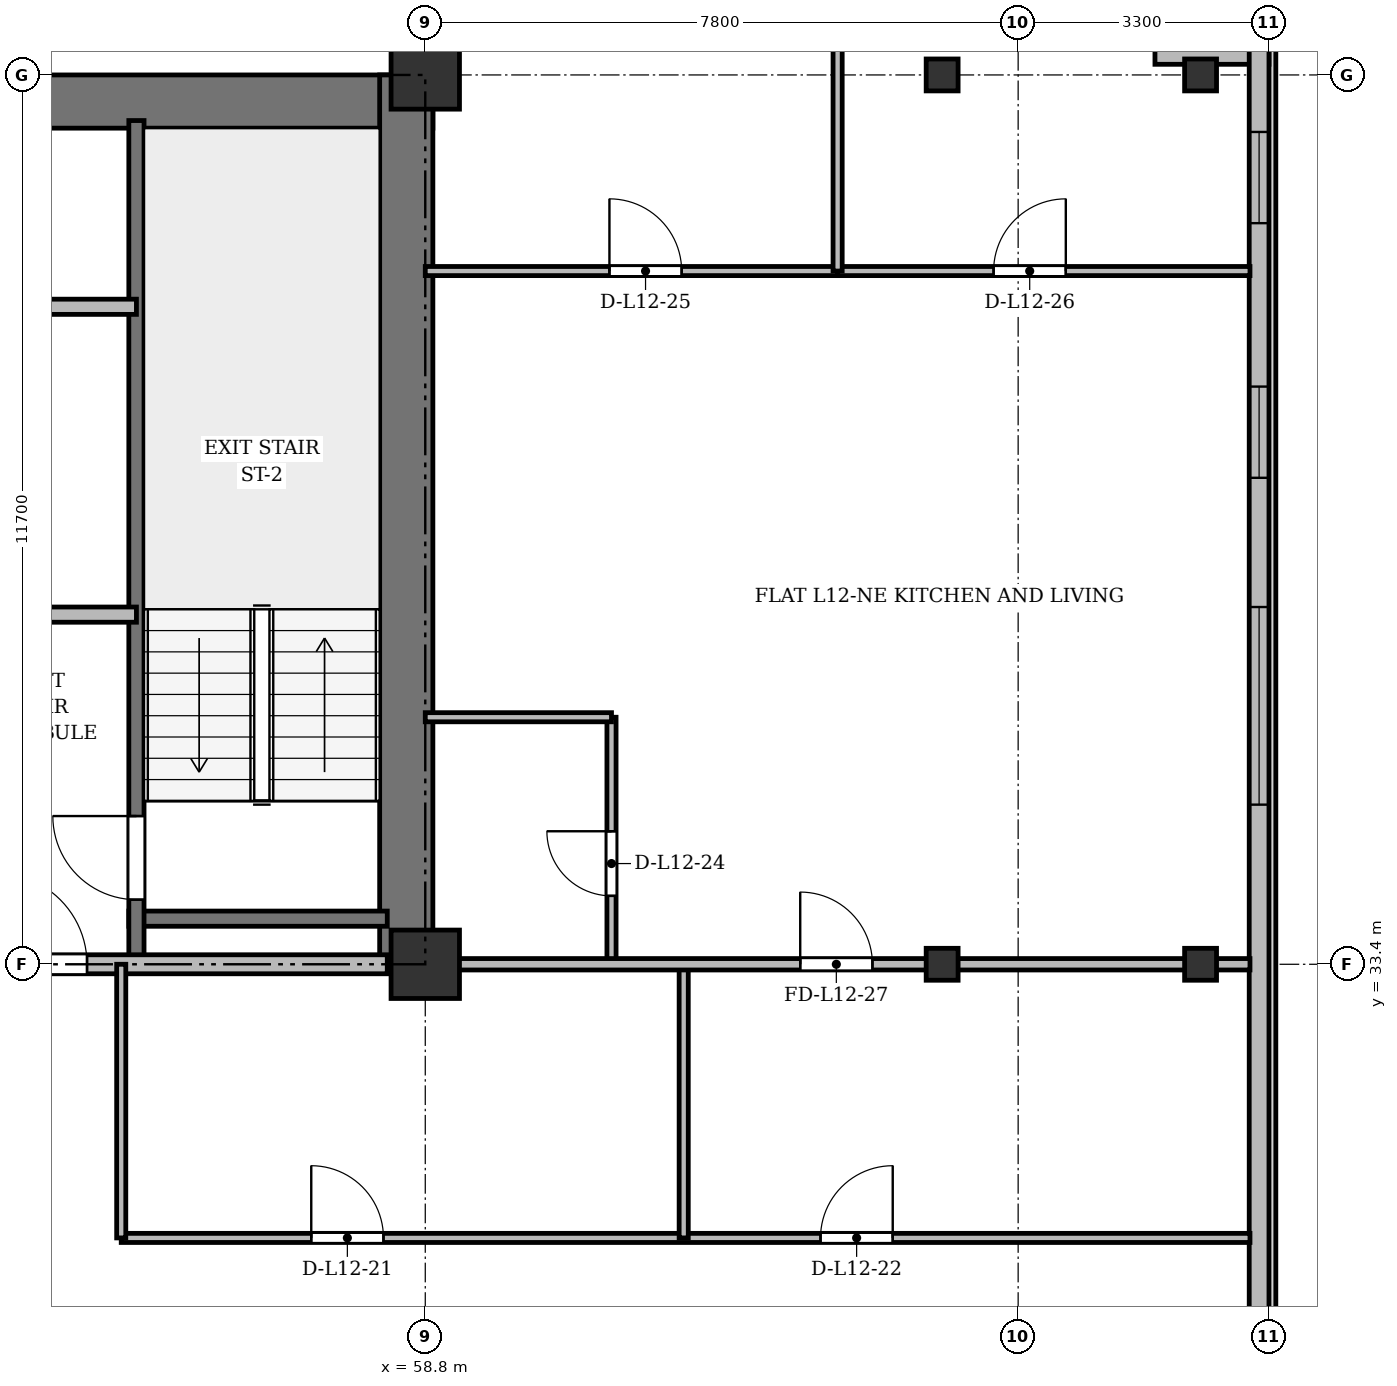
"""IFC4 building model, lengths in metres.
Left out: names, types, materials, properties, quantities, classifications, styles, units other than length and angle.
Written with IfcOpenShell. Run it as: python <this file> out.ifc"""

import sys

from ifc_helpers import new_model, si_unit, direction, frame, frame_2d, origin, origin_2d, place, context, subcontext, project, spatial, rectangle, i_section, extrude, source, transform, mapped, element, fill, save


model = new_model("IFC4")
c1 = context("Model", 3, precision=1e-05, world=origin(), true_north=direction((0.0, 1.0)))
c2 = subcontext(c1, "Body", "Model", "MODEL_VIEW")
j1 = project(units=[si_unit("LENGTHUNIT", "METRE"), si_unit("PLANEANGLEUNIT", "RADIAN")], contexts=[c1])
p1 = place(None, origin())
s1 = spatial("IfcSite", under=j1, at=p1, CompositionType="ELEMENT")
p2 = place(p1, origin())
s2 = spatial("IfcBuilding", under=s1, at=p2, CompositionType="ELEMENT")
p3 = place(p2, frame((0.0, 0.0, 48.7)))
s3 = spatial("IfcBuildingStorey", under=s2, at=p3, CompositionType="ELEMENT", Elevation=48.7)
m1 = source(origin(), c2, "Body", "SweptSolid", [
    extrude(rectangle(XDim=0.9, YDim=0.9, at=origin_2d()), origin(), (0.0, 0.0, 1.0), 3.6),
])
for number, where, z_axis, x_axis in (
    (1, (58.8, 33.4, 0.0), (0.0, 0.0, 1.0), (1.0, 0.0, 0.0)),
    (2, (58.8, 45.1, 0.0), (0.0, 0.0, 1.0), (1.0, 0.0, 0.0)),
):
    element("IfcColumn", number, at=place(p3, frame(where, z_axis=z_axis, x_axis=x_axis)), inside=s3, PredefinedType="COLUMN", context=c2, shape_type="MappedRepresentation", body=[
        mapped(m1, transform((0.0, 0.0, 0.0), x_axis=(1.0, 0.0, 0.0), y_axis=(0.0, 1.0, 0.0), z_axis=(0.0, 0.0, 1.0), scale=1.0)),
    ])
m2 = source(origin(), c2, "Body", "SweptSolid", [
    extrude(i_section(OverallWidth=0.42, OverallDepth=0.42, WebThickness=0.026, FlangeThickness=0.04, at=origin_2d()), origin(), (0.0, 0.0, 1.0), 3.6),
])
for number, where, z_axis, x_axis in (
    (3, (65.6, 33.4, 0.0), (0.0, 0.0, 1.0), (1.0, 0.0, 0.0)),
    (4, (65.6, 45.1, 0.0), (0.0, 0.0, 1.0), (1.0, 0.0, 0.0)),
    (5, (69.0, 33.4, 0.0), (0.0, 0.0, 1.0), (1.0, 0.0, 0.0)),
    (6, (69.0, 45.1, 0.0), (0.0, 0.0, 1.0), (1.0, 0.0, 0.0)),
):
    element("IfcColumn", number, at=place(p3, frame(where, z_axis=z_axis, x_axis=x_axis)), inside=s3, PredefinedType="COLUMN", context=c2, shape_type="MappedRepresentation", body=[
        mapped(m2, transform((0.0, 0.0, 0.0), x_axis=(1.0, 0.0, 0.0), y_axis=(0.0, 1.0, 0.0), z_axis=(0.0, 0.0, 1.0), scale=1.0)),
    ])
p4 = place(p3, frame((68.4, 45.37, 0.0), z_axis=(0.0, 0.0, 1.0), x_axis=(1.0, 0.0, 0.0)))
e7 = element("IfcWall", 7, at=p4, inside=s3, PredefinedType="SOLIDWALL", context=c2, shape_type="SweptSolid", body=[
    extrude(rectangle(XDim=1.5, YDim=0.26, at=frame_2d((0.75, 0.0))), origin(), (0.0, 0.0, 1.0), 2.69),
])
p5 = place(p3, frame((69.77, 45.5, 0.0), z_axis=(0.0, 0.0, 1.0), x_axis=(0.0, -1.0, 0.0)))
e8 = element("IfcWall", 8, at=p5, inside=s3, PredefinedType="SOLIDWALL", context=c2, shape_type="SweptSolid", body=[
    extrude(rectangle(XDim=39.6, YDim=0.26, at=frame_2d((19.8, 0.0))), origin(), (0.0, 0.0, 1.0), 3.34),
])
p6 = place(p5, frame((36.95, 0.0, 0.92)))
e9 = element("IfcOpeningElement", 9, at=p6, cuts=e8, PredefinedType="OPENING", context=c2, shape_type="SweptSolid", body=[
    extrude(rectangle(XDim=1.2, YDim=1.65, at=frame_2d((0.6, 0.825))), frame((0.0, 0.14, 0.0), z_axis=(0.0, -1.0, 0.0), x_axis=(1.0, 0.0, 0.0)), (0.0, 0.0, 1.0), 0.28),
])
p7 = place(p5, frame((32.8, 0.0, 0.92)))
e10 = element("IfcOpeningElement", 10, at=p7, cuts=e8, PredefinedType="OPENING", context=c2, shape_type="SweptSolid", body=[
    extrude(rectangle(XDim=2.6, YDim=1.9, at=frame_2d((1.3, 0.95))), frame((0.0, 0.14, 0.0), z_axis=(0.0, -1.0, 0.0), x_axis=(1.0, 0.0, 0.0)), (0.0, 0.0, 1.0), 0.28),
])
p8 = place(p5, frame((28.6, 0.0, 0.92)))
e11 = element("IfcOpeningElement", 11, at=p8, cuts=e8, PredefinedType="OPENING", context=c2, shape_type="SweptSolid", body=[
    extrude(rectangle(XDim=2.6, YDim=1.9, at=frame_2d((1.3, 0.95))), frame((0.0, 0.14, 0.0), z_axis=(0.0, -1.0, 0.0), x_axis=(1.0, 0.0, 0.0)), (0.0, 0.0, 1.0), 0.28),
])
p9 = place(p5, frame((21.4, 0.0, 0.92)))
e12 = element("IfcOpeningElement", 12, at=p9, cuts=e8, PredefinedType="OPENING", context=c2, shape_type="SweptSolid", body=[
    extrude(rectangle(XDim=2.6, YDim=1.9, at=frame_2d((1.3, 0.95))), frame((0.0, 0.14, 0.0), z_axis=(0.0, -1.0, 0.0), x_axis=(1.0, 0.0, 0.0)), (0.0, 0.0, 1.0), 0.28),
])
p10 = place(p5, frame((7.4, 0.0, 0.92)))
e13 = element("IfcOpeningElement", 13, at=p10, cuts=e8, PredefinedType="OPENING", context=c2, shape_type="SweptSolid", body=[
    extrude(rectangle(XDim=2.6, YDim=1.9, at=frame_2d((1.3, 0.95))), frame((0.0, 0.14, 0.0), z_axis=(0.0, -1.0, 0.0), x_axis=(1.0, 0.0, 0.0)), (0.0, 0.0, 1.0), 0.28),
])
p11 = place(p5, frame((4.5, 0.0, 0.92)))
e14 = element("IfcOpeningElement", 14, at=p11, cuts=e8, PredefinedType="OPENING", context=c2, shape_type="SweptSolid", body=[
    extrude(rectangle(XDim=1.2, YDim=1.65, at=frame_2d((0.6, 0.825))), frame((0.0, 0.14, 0.0), z_axis=(0.0, -1.0, 0.0), x_axis=(1.0, 0.0, 0.0)), (0.0, 0.0, 1.0), 0.28),
])
p12 = place(p5, frame((1.15, 0.0, 0.92)))
e15 = element("IfcOpeningElement", 15, at=p12, cuts=e8, PredefinedType="OPENING", context=c2, shape_type="SweptSolid", body=[
    extrude(rectangle(XDim=1.2, YDim=1.65, at=frame_2d((0.6, 0.825))), frame((0.0, 0.14, 0.0), z_axis=(0.0, -1.0, 0.0), x_axis=(1.0, 0.0, 0.0)), (0.0, 0.0, 1.0), 0.28),
])
p13 = place(p3, frame((15.5, 44.75, 0.0), z_axis=(0.0, 0.0, 1.0), x_axis=(1.0, 0.0, 0.0)))
e16 = element("IfcWall", 16, at=p13, inside=s3, PredefinedType="SHEAR", context=c2, shape_type="SweptSolid", body=[
    extrude(rectangle(XDim=43.4, YDim=0.7, at=frame_2d((21.7, 0.0))), origin(), (0.0, 0.0, 1.0), 3.34),
])
p14 = place(p3, frame((58.55, 33.4, 0.0), z_axis=(0.0, 0.0, 1.0), x_axis=(0.0, 1.0, 0.0)))
e17 = element("IfcWall", 17, at=p14, inside=s3, PredefinedType="SHEAR", context=c2, shape_type="SweptSolid", body=[
    extrude(rectangle(XDim=11.7, YDim=0.7, at=frame_2d((5.85, 0.0))), origin(), (0.0, 0.0, 1.0), 3.34),
])
p15 = place(p3, frame((54.9, 34.0, 0.0), z_axis=(0.0, 0.0, 1.0), x_axis=(1.0, 0.0, 0.0)))
e18 = element("IfcWall", 18, at=p15, inside=s3, PredefinedType="SHEAR", context=c2, shape_type="SweptSolid", body=[
    extrude(rectangle(XDim=3.4, YDim=0.2, at=frame_2d((1.7, 0.0))), origin(), (0.0, 0.0, 1.0), 3.34),
])
p16 = place(p3, frame((55.0, 33.4, 0.0), z_axis=(0.0, 0.0, 1.0), x_axis=(0.0, 1.0, 0.0)))
e19 = element("IfcWall", 19, at=p16, inside=s3, PredefinedType="SHEAR", context=c2, shape_type="SweptSolid", body=[
    extrude(rectangle(XDim=11.1, YDim=0.2, at=frame_2d((5.55, 0.0))), origin(), (0.0, 0.0, 1.0), 3.34),
])
p17 = place(p16, frame((0.85, 0.0, 0.0)))
e20 = element("IfcOpeningElement", 20, at=p17, cuts=e19, PredefinedType="OPENING", context=c2, shape_type="SweptSolid", body=[
    extrude(rectangle(XDim=1.1, YDim=2.15, at=frame_2d((0.55, 1.075))), frame((0.0, 0.11, 0.0), z_axis=(0.0, -1.0, 0.0), x_axis=(1.0, 0.0, 0.0)), (0.0, 0.0, 1.0), 0.22),
])
p18 = place(p3, frame((47.15, 42.05, 0.0), z_axis=(0.0, 0.0, 1.0), x_axis=(1.0, 0.0, 0.0)))
e21 = element("IfcWall", 21, at=p18, inside=s3, PredefinedType="SOLIDWALL", context=c2, shape_type="SweptSolid", body=[
    extrude(rectangle(XDim=7.85, YDim=0.2, at=frame_2d((3.925, 0.0))), origin(), (0.0, 0.0, 1.0), 2.752),
])
p19 = place(p18, frame((0.75, 0.0, 0.0)))
e22 = element("IfcOpeningElement", 22, at=p19, cuts=e21, PredefinedType="OPENING", context=c2, shape_type="SweptSolid", body=[
    extrude(rectangle(XDim=0.9, YDim=2.1, at=frame_2d((0.45, 1.05))), frame((0.0, 0.11, 0.0), z_axis=(0.0, -1.0, 0.0), x_axis=(1.0, 0.0, 0.0)), (0.0, 0.0, 1.0), 0.22),
])
p20 = place(p18, frame((3.85, 0.0, 0.0)))
e23 = element("IfcOpeningElement", 23, at=p20, cuts=e21, PredefinedType="OPENING", context=c2, shape_type="SweptSolid", body=[
    extrude(rectangle(XDim=0.9, YDim=2.1, at=frame_2d((0.45, 1.05))), frame((0.0, 0.11, 0.0), z_axis=(0.0, -1.0, 0.0), x_axis=(1.0, 0.0, 0.0)), (0.0, 0.0, 1.0), 0.22),
])
p21 = place(p3, frame((52.45, 38.0, 0.0), z_axis=(0.0, 0.0, 1.0), x_axis=(1.0, 0.0, 0.0)))
e24 = element("IfcWall", 24, at=p21, inside=s3, PredefinedType="PARTITIONING", context=c2, shape_type="SweptSolid", body=[
    extrude(rectangle(XDim=2.55, YDim=0.2, at=frame_2d((1.275, 0.0))), origin(), (0.0, 0.0, 1.0), 3.34),
])
p22 = place(p3, frame((47.15, 33.4, 0.0), z_axis=(0.0, 0.0, 1.0), x_axis=(1.0, 0.0, 0.0)))
e25 = element("IfcWall", 25, at=p22, inside=s3, PredefinedType="PARTITIONING", context=c2, shape_type="SweptSolid", body=[
    extrude(rectangle(XDim=11.15, YDim=0.25, at=frame_2d((5.575, 0.0))), origin(), (0.0, 0.0, 1.0), 2.69),
])
p23 = place(p22, frame((0.7, 0.0, 0.0)))
e26 = element("IfcOpeningElement", 26, at=p23, cuts=e25, PredefinedType="OPENING", context=c2, shape_type="SweptSolid", body=[
    extrude(rectangle(XDim=0.95, YDim=2.15, at=frame_2d((0.475, 1.075))), frame((0.0, 0.135, 0.0), z_axis=(0.0, -1.0, 0.0), x_axis=(1.0, 0.0, 0.0)), (0.0, 0.0, 1.0), 0.27),
])
p24 = place(p22, frame((6.0, 0.0, 0.0)))
e27 = element("IfcOpeningElement", 27, at=p24, cuts=e25, PredefinedType="OPENING", context=c2, shape_type="SweptSolid", body=[
    extrude(rectangle(XDim=1.2, YDim=2.15, at=frame_2d((0.6, 1.075))), frame((0.0, 0.135, 0.0), z_axis=(0.0, -1.0, 0.0), x_axis=(1.0, 0.0, 0.0)), (0.0, 0.0, 1.0), 0.27),
])
p25 = place(p3, frame((54.8, 29.8, 0.0), z_axis=(0.0, 0.0, 1.0), x_axis=(1.0, 0.0, 0.0)))
e28 = element("IfcWall", 28, at=p25, inside=s3, PredefinedType="PARTITIONING", context=c2, shape_type="SweptSolid", body=[
    extrude(rectangle(XDim=14.85, YDim=0.12, at=frame_2d((7.425, 0.0))), origin(), (0.0, 0.0, 1.0), 2.752),
])
p26 = place(p25, frame((2.5, 0.0, 0.0)))
e29 = element("IfcOpeningElement", 29, at=p26, cuts=e28, PredefinedType="OPENING", context=c2, shape_type="SweptSolid", body=[
    extrude(rectangle(XDim=0.95, YDim=2.15, at=frame_2d((0.475, 1.075))), frame((0.0, 0.07, 0.0), z_axis=(0.0, -1.0, 0.0), x_axis=(1.0, 0.0, 0.0)), (0.0, 0.0, 1.0), 0.14),
])
p27 = place(p25, frame((9.2, 0.0, 0.0)))
e30 = element("IfcOpeningElement", 30, at=p27, cuts=e28, PredefinedType="OPENING", context=c2, shape_type="SweptSolid", body=[
    extrude(rectangle(XDim=0.95, YDim=2.15, at=frame_2d((0.475, 1.075))), frame((0.0, 0.07, 0.0), z_axis=(0.0, -1.0, 0.0), x_axis=(1.0, 0.0, 0.0)), (0.0, 0.0, 1.0), 0.14),
])
for number, where, z_axis, x_axis in (
    (31, (62.2, 29.8, 0.0), (0.0, 0.0, 1.0), (0.0, 1.0, 0.0)),
    (32, (54.8, 29.8, 0.0), (0.0, 0.0, 1.0), (0.0, 1.0, 0.0)),
):
    element("IfcWall", number, at=place(p3, frame(where, z_axis=z_axis, x_axis=x_axis)), inside=s3, PredefinedType="PARTITIONING", context=c2, shape_type="SweptSolid", body=[
        extrude(rectangle(XDim=3.6, YDim=0.12, at=frame_2d((1.8, 0.0))), origin(), (0.0, 0.0, 1.0), 2.69),
    ])
p28 = place(p3, frame((61.25, 33.4, 0.0), z_axis=(0.0, 0.0, 1.0), x_axis=(0.0, 1.0, 0.0)))
e33 = element("IfcWall", 33, at=p28, inside=s3, PredefinedType="PARTITIONING", context=c2, shape_type="SweptSolid", body=[
    extrude(rectangle(XDim=3.25, YDim=0.12, at=frame_2d((1.625, 0.0))), origin(), (0.0, 0.0, 1.0), 2.69),
])
p29 = place(p28, frame((0.9, 0.0, 0.0)))
e34 = element("IfcOpeningElement", 34, at=p29, cuts=e33, PredefinedType="OPENING", context=c2, shape_type="SweptSolid", body=[
    extrude(rectangle(XDim=0.85, YDim=2.1, at=frame_2d((0.425, 1.05))), frame((0.0, 0.07, 0.0), z_axis=(0.0, -1.0, 0.0), x_axis=(1.0, 0.0, 0.0)), (0.0, 0.0, 1.0), 0.14),
])
p30 = place(p3, frame((58.8, 36.65, 0.0), z_axis=(0.0, 0.0, 1.0), x_axis=(1.0, 0.0, 0.0)))
e35 = element("IfcWall", 35, at=p30, inside=s3, PredefinedType="PARTITIONING", context=c2, shape_type="SweptSolid", body=[
    extrude(rectangle(XDim=2.45, YDim=0.12, at=frame_2d((1.225, 0.0))), origin(), (0.0, 0.0, 1.0), 2.752),
])
p31 = place(p3, frame((58.8, 42.52, 0.0), z_axis=(0.0, 0.0, 1.0), x_axis=(1.0, 0.0, 0.0)))
e36 = element("IfcWall", 36, at=p31, inside=s3, PredefinedType="PARTITIONING", context=c2, shape_type="SweptSolid", body=[
    extrude(rectangle(XDim=5.425, YDim=0.12, at=frame_2d((2.712, 0.0))), origin(), (0.0, 0.0, 1.0), 2.752),
])
p32 = place(p31, frame((2.423, 0.0, 0.0)))
e37 = element("IfcOpeningElement", 37, at=p32, cuts=e36, PredefinedType="OPENING", context=c2, shape_type="SweptSolid", body=[
    extrude(rectangle(XDim=0.95, YDim=2.15, at=frame_2d((0.475, 1.075))), frame((0.0, 0.07, 0.0), z_axis=(0.0, -1.0, 0.0), x_axis=(1.0, 0.0, 0.0)), (0.0, 0.0, 1.0), 0.14),
])
p33 = place(p3, frame((64.225, 42.52, 0.0), z_axis=(0.0, 0.0, 1.0), x_axis=(1.0, 0.0, 0.0)))
e38 = element("IfcWall", 38, at=p33, inside=s3, PredefinedType="PARTITIONING", context=c2, shape_type="SweptSolid", body=[
    extrude(rectangle(XDim=5.425, YDim=0.12, at=frame_2d((2.712, 0.0))), origin(), (0.0, 0.0, 1.0), 2.752),
])
p34 = place(p33, frame((2.052, 0.0, 0.0)))
e39 = element("IfcOpeningElement", 39, at=p34, cuts=e38, PredefinedType="OPENING", context=c2, shape_type="SweptSolid", body=[
    extrude(rectangle(XDim=0.95, YDim=2.15, at=frame_2d((0.475, 1.075))), frame((0.0, 0.07, 0.0), z_axis=(0.0, -1.0, 0.0), x_axis=(1.0, 0.0, 0.0)), (0.0, 0.0, 1.0), 0.14),
])
p35 = place(p3, frame((64.225, 42.52, 0.0), z_axis=(0.0, 0.0, 1.0), x_axis=(0.0, 1.0, 0.0)))
e40 = element("IfcWall", 40, at=p35, inside=s3, PredefinedType="PARTITIONING", context=c2, shape_type="SweptSolid", body=[
    extrude(rectangle(XDim=5.72, YDim=0.12, at=frame_2d((2.86, 0.0))), origin(), (0.0, 0.0, 1.0), 2.69),
])
p36 = place(p3, frame((58.8, 33.4, 0.0), z_axis=(0.0, 0.0, 1.0), x_axis=(1.0, 0.0, 0.0)))
e41 = element("IfcWall", 41, at=p36, inside=s3, PredefinedType="PARTITIONING", context=c2, shape_type="SweptSolid", body=[
    extrude(rectangle(XDim=10.85, YDim=0.15, at=frame_2d((5.425, 0.0))), origin(), (0.0, 0.0, 1.0), 2.69),
])
p37 = place(p36, frame((4.933, 0.0, 0.0)))
e42 = element("IfcOpeningElement", 42, at=p37, cuts=e41, PredefinedType="OPENING", context=c2, shape_type="SweptSolid", body=[
    extrude(rectangle(XDim=0.95, YDim=2.15, at=frame_2d((0.475, 1.075))), frame((0.0, 0.085, 0.0), z_axis=(0.0, -1.0, 0.0), x_axis=(1.0, 0.0, 0.0)), (0.0, 0.0, 1.0), 0.17),
])
p38 = place(p3, frame((58.8, 44.75, 0.0), z_axis=(0.0, 0.0, 1.0), x_axis=(0.0, 1.0, 0.0)))
e43 = element("IfcWall", 43, at=p38, inside=s3, PredefinedType="PARTITIONING", context=c2, shape_type="SweptSolid", body=[
    extrude(rectangle(XDim=3.61, YDim=0.15, at=frame_2d((1.805, 0.0))), origin(), (0.0, 0.0, 1.0), 2.752),
])
p39 = place(p38, frame((1.1, 0.0, 0.0)))
e44 = element("IfcOpeningElement", 44, at=p39, cuts=e43, PredefinedType="OPENING", context=c2, shape_type="SweptSolid", body=[
    extrude(rectangle(XDim=0.95, YDim=2.15, at=frame_2d((0.475, 1.075))), frame((0.0, 0.085, 0.0), z_axis=(0.0, -1.0, 0.0), x_axis=(1.0, 0.0, 0.0)), (0.0, 0.0, 1.0), 0.17),
])
m3 = source(origin(), c2, "Body", "SweptSolid", [
    extrude(rectangle(XDim=2.6, YDim=1.9, at=frame_2d((1.3, 0.95))), frame((0.0, 0.03, 0.0), z_axis=(0.0, -1.0, 0.0), x_axis=(1.0, 0.0, 0.0)), (0.0, 0.0, 1.0), 0.06),
])
p40 = place(p10, origin())
e45 = element("IfcWindow", 45, at=p40, inside=s3, PartitioningType="SINGLE_PANEL", PredefinedType="WINDOW", context=c2, shape_type="MappedRepresentation", body=[
    mapped(m3, transform((0.0, 0.0, 0.0), x_axis=(1.0, 0.0, 0.0), y_axis=(0.0, 1.0, 0.0), z_axis=(0.0, 0.0, 1.0), scale=1.0)),
])
fill(e13, e45)
m4 = source(origin(), c2, "Body", "SweptSolid", [
    extrude(rectangle(XDim=1.2, YDim=1.65, at=frame_2d((0.6, 0.825))), frame((0.0, 0.03, 0.0), z_axis=(0.0, -1.0, 0.0), x_axis=(1.0, 0.0, 0.0)), (0.0, 0.0, 1.0), 0.06),
])
p41 = place(p11, origin())
e46 = element("IfcWindow", 46, at=p41, inside=s3, PartitioningType="SINGLE_PANEL", PredefinedType="WINDOW", context=c2, shape_type="MappedRepresentation", body=[
    mapped(m4, transform((0.0, 0.0, 0.0), x_axis=(1.0, 0.0, 0.0), y_axis=(0.0, 1.0, 0.0), z_axis=(0.0, 0.0, 1.0), scale=1.0)),
])
fill(e14, e46)
p42 = place(p12, origin())
e47 = element("IfcWindow", 47, at=p42, inside=s3, PartitioningType="SINGLE_PANEL", PredefinedType="WINDOW", context=c2, shape_type="MappedRepresentation", body=[
    mapped(m4, transform((0.0, 0.0, 0.0), x_axis=(1.0, 0.0, 0.0), y_axis=(0.0, 1.0, 0.0), z_axis=(0.0, 0.0, 1.0), scale=1.0)),
])
fill(e15, e47)
m5 = source(origin(), c2, "Body", "SweptSolid", [
    extrude(rectangle(XDim=1.1, YDim=2.15, at=frame_2d((0.55, 1.075))), frame((0.0, 0.025, 0.0), z_axis=(0.0, -1.0, 0.0), x_axis=(1.0, 0.0, 0.0)), (0.0, 0.0, 1.0), 0.05),
])
p43 = place(p17, origin())
e48 = element("IfcDoor", 48, at=p43, inside=s3, OperationType="SINGLE_SWING_RIGHT", PredefinedType="DOOR", context=c2, shape_type="MappedRepresentation", body=[
    mapped(m5, transform((0.0, 0.0, 0.0), x_axis=(1.0, 0.0, 0.0), y_axis=(0.0, 1.0, 0.0), z_axis=(0.0, 0.0, 1.0), scale=1.0)),
])
fill(e20, e48)
m6 = source(origin(), c2, "Body", "SweptSolid", [
    extrude(rectangle(XDim=1.2, YDim=2.15, at=frame_2d((0.6, 1.075))), frame((0.0, 0.025, 0.0), z_axis=(0.0, -1.0, 0.0), x_axis=(1.0, 0.0, 0.0)), (0.0, 0.0, 1.0), 0.05),
])
p44 = place(p24, origin())
e49 = element("IfcDoor", 49, at=p44, inside=s3, OperationType="SINGLE_SWING_LEFT", PredefinedType="DOOR", context=c2, shape_type="MappedRepresentation", body=[
    mapped(m6, transform((0.0, 0.0, 0.0), x_axis=(1.0, 0.0, 0.0), y_axis=(0.0, 1.0, 0.0), z_axis=(0.0, 0.0, 1.0), scale=1.0)),
])
fill(e27, e49)
m7 = source(origin(), c2, "Body", "SweptSolid", [
    extrude(rectangle(XDim=0.95, YDim=2.15, at=frame_2d((0.475, 1.075))), frame((0.0, 0.025, 0.0), z_axis=(0.0, -1.0, 0.0), x_axis=(1.0, 0.0, 0.0)), (0.0, 0.0, 1.0), 0.05),
])
p45 = place(p26, origin())
e50 = element("IfcDoor", 50, at=p45, inside=s3, OperationType="SINGLE_SWING_LEFT", PredefinedType="DOOR", context=c2, shape_type="MappedRepresentation", body=[
    mapped(m7, transform((0.0, 0.0, 0.0), x_axis=(1.0, 0.0, 0.0), y_axis=(0.0, 1.0, 0.0), z_axis=(0.0, 0.0, 1.0), scale=1.0)),
])
fill(e29, e50)
p46 = place(p27, origin())
e51 = element("IfcDoor", 51, at=p46, inside=s3, OperationType="SINGLE_SWING_RIGHT", PredefinedType="DOOR", context=c2, shape_type="MappedRepresentation", body=[
    mapped(m7, transform((0.0, 0.0, 0.0), x_axis=(1.0, 0.0, 0.0), y_axis=(0.0, 1.0, 0.0), z_axis=(0.0, 0.0, 1.0), scale=1.0)),
])
fill(e30, e51)
m8 = source(origin(), c2, "Body", "SweptSolid", [
    extrude(rectangle(XDim=0.85, YDim=2.1, at=frame_2d((0.425, 1.05))), frame((0.0, 0.025, 0.0), z_axis=(0.0, -1.0, 0.0), x_axis=(1.0, 0.0, 0.0)), (0.0, 0.0, 1.0), 0.05),
])
p47 = place(p29, origin())
e52 = element("IfcDoor", 52, at=p47, inside=s3, OperationType="SINGLE_SWING_RIGHT", PredefinedType="DOOR", context=c2, shape_type="MappedRepresentation", body=[
    mapped(m8, transform((0.0, 0.0, 0.0), x_axis=(1.0, 0.0, 0.0), y_axis=(0.0, 1.0, 0.0), z_axis=(0.0, 0.0, 1.0), scale=1.0)),
])
fill(e34, e52)
p48 = place(p32, origin())
e53 = element("IfcDoor", 53, at=p48, inside=s3, OperationType="SINGLE_SWING_LEFT", PredefinedType="DOOR", context=c2, shape_type="MappedRepresentation", body=[
    mapped(m7, transform((0.0, 0.0, 0.0), x_axis=(1.0, 0.0, 0.0), y_axis=(0.0, 1.0, 0.0), z_axis=(0.0, 0.0, 1.0), scale=1.0)),
])
fill(e37, e53)
p49 = place(p34, origin())
e54 = element("IfcDoor", 54, at=p49, inside=s3, OperationType="SINGLE_SWING_RIGHT", PredefinedType="DOOR", context=c2, shape_type="MappedRepresentation", body=[
    mapped(m7, transform((0.0, 0.0, 0.0), x_axis=(1.0, 0.0, 0.0), y_axis=(0.0, 1.0, 0.0), z_axis=(0.0, 0.0, 1.0), scale=1.0)),
])
fill(e39, e54)
p50 = place(p37, origin())
e55 = element("IfcDoor", 55, at=p50, inside=s3, OperationType="SINGLE_SWING_LEFT", PredefinedType="DOOR", context=c2, shape_type="MappedRepresentation", body=[
    mapped(m7, transform((0.0, 0.0, 0.0), x_axis=(1.0, 0.0, 0.0), y_axis=(0.0, 1.0, 0.0), z_axis=(0.0, 0.0, 1.0), scale=1.0)),
])
fill(e42, e55)
save(model, sys.argv[1])
